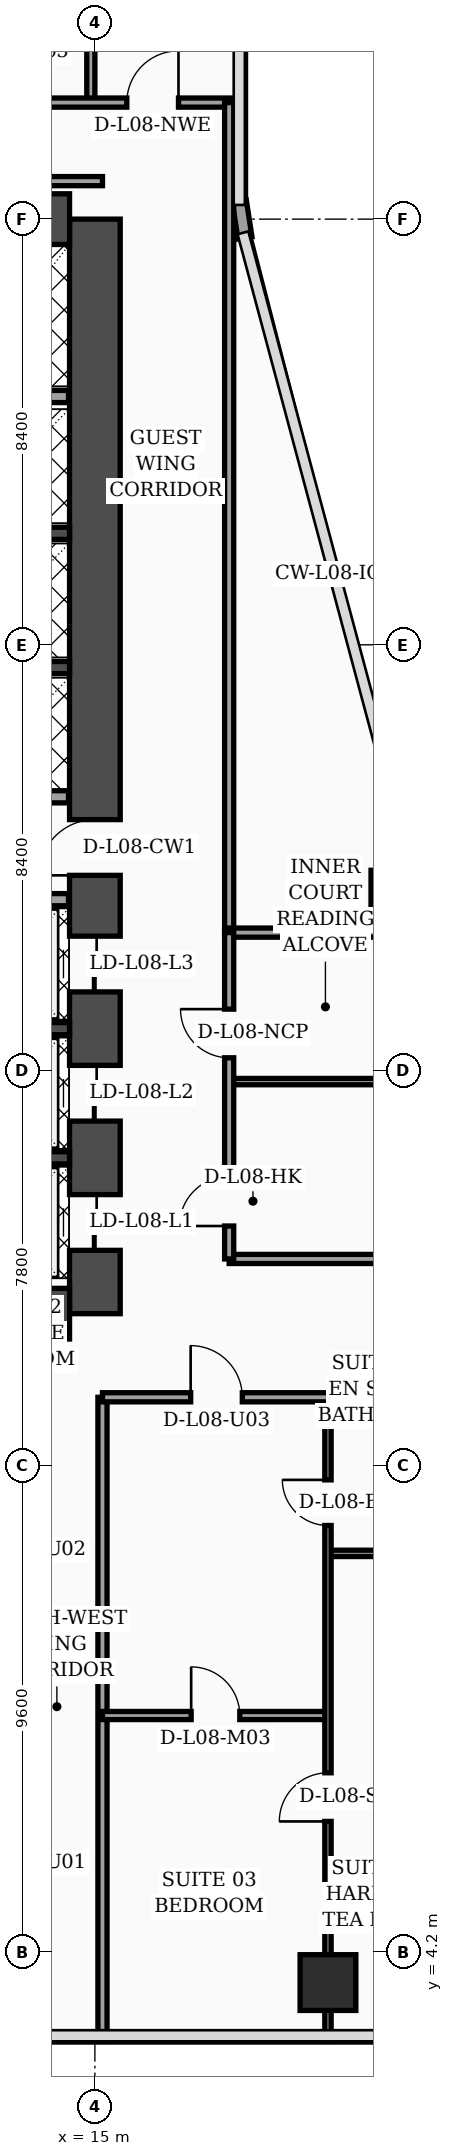
"""IFC4 building model, lengths in metres.
Left out: names, types, materials, properties, quantities, classifications, styles, units other than length and angle.
Written with IfcOpenShell. Run it as: python <this file> out.ifc"""

import sys

from ifc_helpers import new_model, si_unit, direction, frame, frame_2d, origin, origin_2d, place, context, subcontext, project, spatial, rectangle, hollow_rectangle, extrude, element, fill, save


model = new_model("IFC4")
c1 = context("Model", 3, precision=1e-05, world=origin(), true_north=direction((0.0, 1.0)))
c2 = subcontext(c1, "Body", "Model", "MODEL_VIEW")
j1 = project(units=[si_unit("LENGTHUNIT", "METRE"), si_unit("PLANEANGLEUNIT", "RADIAN")], contexts=[c1])
p1 = place(None, origin())
s1 = spatial("IfcSite", under=j1, at=p1, CompositionType="ELEMENT")
p2 = place(p1, origin())
s2 = spatial("IfcBuilding", under=s1, at=p2, CompositionType="ELEMENT")
p3 = place(p2, frame((0.0, 0.0, 38.4)))
s3 = spatial("IfcBuildingStorey", under=s2, at=p3, CompositionType="ELEMENT", Elevation=38.4)
p4 = place(p3, frame((15.0, 16.8, 0.0), z_axis=(0.0, 0.0, 1.0), x_axis=(0.0, 1.0, 0.0)))
e1 = element("IfcWall", 1, at=p4, inside=s3, PredefinedType="SHEAR", context=c2, shape_type="SweptSolid", body=[
    extrude(rectangle(XDim=21.6, YDim=1.0, at=frame_2d((10.8, 0.0))), origin(), (0.0, 0.0, 1.0), 3.56),
])
p5 = place(p4, frame((8.65, 0.0, 0.0)))
e2 = element("IfcOpeningElement", 2, at=p5, cuts=e1, PredefinedType="OPENING", context=c2, shape_type="SweptSolid", body=[
    extrude(rectangle(XDim=1.1, YDim=2.2, at=frame_2d((0.55, 1.1))), frame((0.0, 0.51, 0.0), z_axis=(0.0, -1.0, 0.0), x_axis=(1.0, 0.0, 0.0)), (0.0, 0.0, 1.0), 1.02),
])
p6 = place(p4, frame((1.25, 0.0, 0.0)))
e3 = element("IfcOpeningElement", 3, at=p6, cuts=e1, PredefinedType="OPENING", context=c2, shape_type="SweptSolid", body=[
    extrude(rectangle(XDim=1.1, YDim=2.2, at=frame_2d((0.55, 1.1))), frame((0.0, 0.51, 0.0), z_axis=(0.0, -1.0, 0.0), x_axis=(1.0, 0.0, 0.0)), (0.0, 0.0, 1.0), 1.02),
])
p7 = place(p4, frame((3.8, 0.0, 0.0)))
e4 = element("IfcOpeningElement", 4, at=p7, cuts=e1, PredefinedType="OPENING", context=c2, shape_type="SweptSolid", body=[
    extrude(rectangle(XDim=1.1, YDim=2.2, at=frame_2d((0.55, 1.1))), frame((0.0, 0.51, 0.0), z_axis=(0.0, -1.0, 0.0), x_axis=(1.0, 0.0, 0.0)), (0.0, 0.0, 1.0), 1.02),
])
p8 = place(p4, frame((6.35, 0.0, 0.0)))
e5 = element("IfcOpeningElement", 5, at=p8, cuts=e1, PredefinedType="OPENING", context=c2, shape_type="SweptSolid", body=[
    extrude(rectangle(XDim=1.1, YDim=2.2, at=frame_2d((0.55, 1.1))), frame((0.0, 0.51, 0.0), z_axis=(0.0, -1.0, 0.0), x_axis=(1.0, 0.0, 0.0)), (0.0, 0.0, 1.0), 1.02),
])
for number, where, z_axis, x_axis in (
    (6, (4.7, 38.4, 0.0), (0.0, 0.0, 1.0), (1.0, 0.0, 0.0)),
    (7, (4.7, 16.8, 0.0), (0.0, 0.0, 1.0), (1.0, 0.0, 0.0)),
):
    element("IfcWall", number, at=place(p3, frame(where, z_axis=z_axis, x_axis=x_axis)), inside=s3, PredefinedType="SHEAR", context=c2, shape_type="SweptSolid", body=[
        extrude(rectangle(XDim=9.8, YDim=1.0, at=frame_2d((4.9, 0.0))), origin(), (0.0, 0.0, 1.0), 3.56),
    ])
for number, where, z_axis, x_axis in (
    (8, (12.18, 19.875, 0.0), (0.0, 0.0, 1.0), (1.0, 0.0, 0.0)),
    (9, (12.18, 22.425, 0.0), (0.0, 0.0, 1.0), (1.0, 0.0, 0.0)),
    (10, (12.18, 29.55, 0.0), (0.0, 0.0, 1.0), (1.0, 0.0, 0.0)),
    (11, (12.18, 32.2, 0.0), (0.0, 0.0, 1.0), (1.0, 0.0, 0.0)),
):
    element("IfcWall", number, at=place(p3, frame(where, z_axis=z_axis, x_axis=x_axis)), inside=s3, PredefinedType="SOLIDWALL", context=c2, shape_type="SweptSolid", body=[
        extrude(rectangle(XDim=2.32, YDim=0.24, at=frame_2d((1.16, 0.0))), origin(), (0.0, 0.0, 1.0), 3.56),
    ])
for number, where, z_axis, x_axis in (
    (12, (21.0, 25.0, 0.0), (0.0, 0.0, 1.0), (1.0, 0.0, 0.0)),
    (13, (19.6, 3.6, 0.0), (0.0, 0.0, 1.0), (1.0, 0.0, 0.0)),
):
    element("IfcColumn", number, at=place(p3, frame(where, z_axis=z_axis, x_axis=x_axis)), inside=s3, PredefinedType="COLUMN", context=c2, shape_type="SweptSolid", body=[
        extrude(hollow_rectangle(XDim=1.1, YDim=1.1, WallThickness=0.045, at=origin_2d()), origin(), (0.0, 0.0, 1.0), 3.56),
    ])
p9 = place(p3, frame((17.962, 38.03, 0.0), z_axis=(0.0, 0.0, 1.0), x_axis=(-0.15141125477, 0.988470855377, 0.0)))
e14 = element("IfcWall", 14, at=p9, inside=s3, PredefinedType="SOLIDWALL", context=c2, shape_type="SweptSolid", body=[
    extrude(rectangle(XDim=0.739, YDim=0.28, at=frame_2d((0.369, 0.0))), origin(), (0.0, 0.0, 1.0), 3.56),
])
p10 = place(p3, frame((12.15, 24.97, 0.0), z_axis=(0.0, 0.0, 1.0), x_axis=(1.0, 0.0, 0.0)))
e15 = element("IfcWall", 15, at=p10, inside=s3, PredefinedType="SOLIDWALL", context=c2, shape_type="SweptSolid", body=[
    extrude(rectangle(XDim=2.33, YDim=0.24, at=frame_2d((1.165, 0.0))), origin(), (0.0, 0.0, 1.0), 2.84),
])
p11 = place(p3, frame((12.25, 27.0, 0.0), z_axis=(0.0, 0.0, 1.0), x_axis=(1.0, 0.0, 0.0)))
e16 = element("IfcWall", 16, at=p11, inside=s3, PredefinedType="SOLIDWALL", context=c2, shape_type="SweptSolid", body=[
    extrude(rectangle(XDim=2.23, YDim=0.24, at=frame_2d((1.115, 0.0))), origin(), (0.0, 0.0, 1.0), 3.56),
])
p12 = place(p3, frame((9.66, 34.9, 0.0), z_axis=(0.0, 0.0, 1.0), x_axis=(1.0, 0.0, 0.0)))
e17 = element("IfcWall", 17, at=p12, inside=s3, PredefinedType="SOLIDWALL", context=c2, shape_type="SweptSolid", body=[
    extrude(rectangle(XDim=4.82, YDim=0.24, at=frame_2d((2.41, 0.0))), origin(), (0.0, 0.0, 1.0), 3.56),
])
p13 = place(p3, frame((15.15, 2.44, 0.0), z_axis=(0.0, 0.0, 1.0), x_axis=(0.0, 1.0, 0.0)))
e18 = element("IfcWall", 18, at=p13, inside=s3, PredefinedType="PARTITIONING", context=c2, shape_type="SweptSolid", body=[
    extrude(rectangle(XDim=12.71, YDim=0.18, at=frame_2d((6.355, 0.0))), origin(), (0.0, 0.0, 1.0), 3.04),
])
p14 = place(p3, frame((19.6, 12.07, 0.0), z_axis=(0.0, 0.0, 1.0), x_axis=(1.0, 0.0, 0.0)))
e19 = element("IfcWall", 19, at=p14, inside=s3, PredefinedType="PARTITIONING", context=c2, shape_type="SweptSolid", body=[
    extrude(rectangle(XDim=2.0, YDim=0.125, at=frame_2d((1.0, 0.0))), origin(), (0.0, 0.0, 1.0), 3.56),
])
p15 = place(p3, frame((15.15, 8.87, 0.0), z_axis=(0.0, 0.0, 1.0), x_axis=(1.0, 0.0, 0.0)))
e20 = element("IfcWall", 20, at=p15, inside=s3, PredefinedType="PARTITIONING", context=c2, shape_type="SweptSolid", body=[
    extrude(rectangle(XDim=4.45, YDim=0.16, at=frame_2d((2.225, 0.0))), origin(), (0.0, 0.0, 1.0), 3.56),
])
p16 = place(p15, frame((1.75, 0.0, 0.0)))
e21 = element("IfcOpeningElement", 21, at=p16, cuts=e20, PredefinedType="OPENING", context=c2, shape_type="SweptSolid", body=[
    extrude(rectangle(XDim=0.96, YDim=2.2, at=frame_2d((0.48, 1.1))), frame((0.0, 0.09, 0.0), z_axis=(0.0, -1.0, 0.0), x_axis=(1.0, 0.0, 0.0)), (0.0, 0.0, 1.0), 0.18),
])
p17 = place(p3, frame((19.6, 2.44, 0.0), z_axis=(0.0, 0.0, 1.0), x_axis=(0.0, 1.0, 0.0)))
e22 = element("IfcWall", 22, at=p17, inside=s3, PredefinedType="PARTITIONING", context=c2, shape_type="SweptSolid", body=[
    extrude(rectangle(XDim=12.71, YDim=0.125, at=frame_2d((6.355, 0.0))), origin(), (0.0, 0.0, 1.0), 2.34),
])
p18 = place(p17, frame((4.34, 0.0, 0.0)))
e23 = element("IfcOpeningElement", 23, at=p18, cuts=e22, PredefinedType="OPENING", context=c2, shape_type="SweptSolid", body=[
    extrude(rectangle(XDim=0.96, YDim=2.2, at=frame_2d((0.48, 1.1))), frame((0.0, 0.073, 0.0), z_axis=(0.0, -1.0, 0.0), x_axis=(1.0, 0.0, 0.0)), (0.0, 0.0, 1.0), 0.145),
])
p19 = place(p17, frame((10.18, 0.0, 0.0)))
e24 = element("IfcOpeningElement", 24, at=p19, cuts=e22, PredefinedType="OPENING", context=c2, shape_type="SweptSolid", body=[
    extrude(rectangle(XDim=0.9, YDim=2.15, at=frame_2d((0.45, 1.075))), frame((0.0, 0.073, 0.0), z_axis=(0.0, -1.0, 0.0), x_axis=(1.0, 0.0, 0.0)), (0.0, 0.0, 1.0), 0.145),
])
p20 = place(p3, frame((15.15, 15.15, 0.0), z_axis=(0.0, 0.0, 1.0), x_axis=(1.0, 0.0, 0.0)))
e25 = element("IfcWall", 25, at=p20, inside=s3, PredefinedType="PARTITIONING", context=c2, shape_type="SweptSolid", body=[
    extrude(rectangle(XDim=6.45, YDim=0.18, at=frame_2d((3.225, 0.0))), origin(), (0.0, 0.0, 1.0), 2.34),
])
p21 = place(p20, frame((1.74, 0.0, 0.0)))
e26 = element("IfcOpeningElement", 26, at=p21, cuts=e25, PredefinedType="OPENING", context=c2, shape_type="SweptSolid", body=[
    extrude(rectangle(XDim=1.02, YDim=2.2, at=frame_2d((0.51, 1.1))), frame((0.0, 0.1, 0.0), z_axis=(0.0, -1.0, 0.0), x_axis=(1.0, 0.0, 0.0)), (0.0, 0.0, 1.0), 0.2),
])
p22 = place(p3, frame((14.92, 40.7, 0.0), z_axis=(0.0, 0.0, 1.0), x_axis=(0.0, 1.0, 0.0)))
e27 = element("IfcWall", 27, at=p22, inside=s3, PredefinedType="PARTITIONING", context=c2, shape_type="SweptSolid", body=[
    extrude(rectangle(XDim=7.1, YDim=0.16, at=frame_2d((3.55, 0.0))), origin(), (0.0, 0.0, 1.0), 3.04),
])
p23 = place(p3, frame((0.08, 40.7, 0.0), z_axis=(0.0, 0.0, 1.0), x_axis=(1.0, 0.0, 0.0)))
e28 = element("IfcWall", 28, at=p23, inside=s3, PredefinedType="PARTITIONING", context=c2, shape_type="SweptSolid", body=[
    extrude(rectangle(XDim=17.77, YDim=0.18, at=frame_2d((8.885, 0.0))), origin(), (0.0, 0.0, 1.0), 2.84),
])
p24 = place(p23, frame((0.9, 0.0, 0.0)))
e29 = element("IfcOpeningElement", 29, at=p24, cuts=e28, PredefinedType="OPENING", context=c2, shape_type="SweptSolid", body=[
    extrude(rectangle(XDim=1.02, YDim=2.2, at=frame_2d((0.51, 1.1))), frame((0.0, 0.1, 0.0), z_axis=(0.0, -1.0, 0.0), x_axis=(1.0, 0.0, 0.0)), (0.0, 0.0, 1.0), 0.2),
])
p25 = place(p23, frame((4.2, 0.0, 0.0)))
e30 = element("IfcOpeningElement", 30, at=p25, cuts=e28, PredefinedType="OPENING", context=c2, shape_type="SweptSolid", body=[
    extrude(rectangle(XDim=1.02, YDim=2.2, at=frame_2d((0.51, 1.1))), frame((0.0, 0.1, 0.0), z_axis=(0.0, -1.0, 0.0), x_axis=(1.0, 0.0, 0.0)), (0.0, 0.0, 1.0), 0.2),
])
p26 = place(p23, frame((10.08, 0.0, 0.0)))
e31 = element("IfcOpeningElement", 31, at=p26, cuts=e28, PredefinedType="OPENING", context=c2, shape_type="SweptSolid", body=[
    extrude(rectangle(XDim=1.02, YDim=2.2, at=frame_2d((0.51, 1.1))), frame((0.0, 0.1, 0.0), z_axis=(0.0, -1.0, 0.0), x_axis=(1.0, 0.0, 0.0)), (0.0, 0.0, 1.0), 0.2),
])
p27 = place(p23, frame((15.55, 0.0, 0.0)))
e32 = element("IfcOpeningElement", 32, at=p27, cuts=e28, PredefinedType="OPENING", context=c2, shape_type="SweptSolid", body=[
    extrude(rectangle(XDim=1.02, YDim=2.2, at=frame_2d((0.51, 1.1))), frame((0.0, 0.1, 0.0), z_axis=(0.0, -1.0, 0.0), x_axis=(1.0, 0.0, 0.0)), (0.0, 0.0, 1.0), 0.2),
])
p28 = place(p3, frame((17.65, 24.3, 0.0), z_axis=(0.0, 0.0, 1.0), x_axis=(0.0, 1.0, 0.0)))
e33 = element("IfcWall", 33, at=p28, inside=s3, PredefinedType="PARTITIONING", context=c2, shape_type="SweptSolid", body=[
    extrude(rectangle(XDim=16.4, YDim=0.18, at=frame_2d((8.2, 0.0))), origin(), (0.0, 0.0, 1.0), 2.84),
])
p29 = place(p3, frame((3.68, 39.15, 0.0), z_axis=(0.0, 0.0, 1.0), x_axis=(1.0, 0.0, 0.0)))
e34 = element("IfcWall", 34, at=p29, inside=s3, PredefinedType="PARTITIONING", context=c2, shape_type="SweptSolid", body=[
    extrude(rectangle(XDim=11.47, YDim=0.18, at=frame_2d((5.735, 0.0))), origin(), (0.0, 0.0, 1.0), 2.84),
])
p30 = place(p3, frame((17.65, 17.88, 0.0), z_axis=(0.0, 0.0, 1.0), x_axis=(1.0, 0.0, 0.0)))
e35 = element("IfcWall", 35, at=p30, inside=s3, PredefinedType="PARTITIONING", context=c2, shape_type="SweptSolid", body=[
    extrude(rectangle(XDim=3.9, YDim=0.18, at=frame_2d((1.95, 0.0))), origin(), (0.0, 0.0, 1.0), 3.56),
])
p31 = place(p3, frame((17.65, 21.38, 0.0), z_axis=(0.0, 0.0, 1.0), x_axis=(1.0, 0.0, 0.0)))
e36 = element("IfcWall", 36, at=p31, inside=s3, PredefinedType="PARTITIONING", context=c2, shape_type="SweptSolid", body=[
    extrude(rectangle(XDim=3.9, YDim=0.125, at=frame_2d((1.95, 0.0))), origin(), (0.0, 0.0, 1.0), 3.09),
])
p32 = place(p3, frame((17.65, 24.32, 0.0), z_axis=(0.0, 0.0, 1.0), x_axis=(1.0, 0.0, 0.0)))
e37 = element("IfcWall", 37, at=p32, inside=s3, PredefinedType="PARTITIONING", context=c2, shape_type="SweptSolid", body=[
    extrude(rectangle(XDim=3.95, YDim=0.18, at=frame_2d((1.975, 0.0))), origin(), (0.0, 0.0, 1.0), 3.56),
])
p33 = place(p3, frame((17.65, 17.88, 0.0), z_axis=(0.0, 0.0, 1.0), x_axis=(0.0, 1.0, 0.0)))
e38 = element("IfcWall", 38, at=p33, inside=s3, PredefinedType="PARTITIONING", context=c2, shape_type="SweptSolid", body=[
    extrude(rectangle(XDim=6.44, YDim=0.18, at=frame_2d((3.22, 0.0))), origin(), (0.0, 0.0, 1.0), 3.09),
])
p34 = place(p33, frame((0.65, 0.0, 0.0)))
e39 = element("IfcOpeningElement", 39, at=p34, cuts=e38, PredefinedType="OPENING", context=c2, shape_type="SweptSolid", body=[
    extrude(rectangle(XDim=0.98, YDim=2.15, at=frame_2d((0.49, 1.075))), frame((0.0, 0.1, 0.0), z_axis=(0.0, -1.0, 0.0), x_axis=(1.0, 0.0, 0.0)), (0.0, 0.0, 1.0), 0.2),
])
p35 = place(p33, frame((3.97, 0.0, 0.0)))
e40 = element("IfcOpeningElement", 40, at=p35, cuts=e38, PredefinedType="OPENING", context=c2, shape_type="SweptSolid", body=[
    extrude(rectangle(XDim=0.96, YDim=2.2, at=frame_2d((0.48, 1.1))), frame((0.0, 0.1, 0.0), z_axis=(0.0, -1.0, 0.0), x_axis=(1.0, 0.0, 0.0)), (0.0, 0.0, 1.0), 0.2),
])
p36 = place(p16, origin())
e41 = element("IfcDoor", 41, at=p36, inside=s3, OperationType="SINGLE_SWING_LEFT", PredefinedType="DOOR", context=c2, shape_type="SweptSolid", body=[
    extrude(rectangle(XDim=0.96, YDim=2.2, at=frame_2d((0.48, 1.1))), frame((0.0, 0.025, 0.0), z_axis=(0.0, -1.0, 0.0), x_axis=(1.0, 0.0, 0.0)), (0.0, 0.0, 1.0), 0.05),
])
fill(e21, e41)
p37 = place(p18, origin())
e42 = element("IfcDoor", 42, at=p37, inside=s3, OperationType="SINGLE_SWING_LEFT", PredefinedType="DOOR", context=c2, shape_type="SweptSolid", body=[
    extrude(rectangle(XDim=0.96, YDim=2.2, at=frame_2d((0.48, 1.1))), frame((0.0, 0.025, 0.0), z_axis=(0.0, -1.0, 0.0), x_axis=(1.0, 0.0, 0.0)), (0.0, 0.0, 1.0), 0.05),
])
fill(e23, e42)
p38 = place(p19, origin())
e43 = element("IfcDoor", 43, at=p38, inside=s3, OperationType="SINGLE_SWING_RIGHT", PredefinedType="DOOR", context=c2, shape_type="SweptSolid", body=[
    extrude(rectangle(XDim=0.9, YDim=2.15, at=frame_2d((0.45, 1.075))), frame((0.0, 0.025, 0.0), z_axis=(0.0, -1.0, 0.0), x_axis=(1.0, 0.0, 0.0)), (0.0, 0.0, 1.0), 0.05),
])
fill(e24, e43)
p39 = place(p21, origin())
e44 = element("IfcDoor", 44, at=p39, inside=s3, OperationType="SINGLE_SWING_LEFT", PredefinedType="DOOR", context=c2, shape_type="SweptSolid", body=[
    extrude(rectangle(XDim=1.02, YDim=2.2, at=frame_2d((0.51, 1.1))), frame((0.0, 0.025, 0.0), z_axis=(0.0, -1.0, 0.0), x_axis=(1.0, 0.0, 0.0)), (0.0, 0.0, 1.0), 0.05),
])
fill(e26, e44)
p40 = place(p27, origin())
e45 = element("IfcDoor", 45, at=p40, inside=s3, OperationType="SINGLE_SWING_RIGHT", PredefinedType="DOOR", context=c2, shape_type="SweptSolid", body=[
    extrude(rectangle(XDim=1.02, YDim=2.2, at=frame_2d((0.51, 1.1))), frame((0.0, 0.025, 0.0), z_axis=(0.0, -1.0, 0.0), x_axis=(1.0, 0.0, 0.0)), (0.0, 0.0, 1.0), 0.05),
])
fill(e32, e45)
p41 = place(p34, origin())
e46 = element("IfcDoor", 46, at=p41, inside=s3, OperationType="SINGLE_SWING_LEFT", PredefinedType="DOOR", context=c2, shape_type="SweptSolid", body=[
    extrude(rectangle(XDim=0.98, YDim=2.15, at=frame_2d((0.49, 1.075))), frame((0.0, 0.025, 0.0), z_axis=(0.0, -1.0, 0.0), x_axis=(1.0, 0.0, 0.0)), (0.0, 0.0, 1.0), 0.05),
])
fill(e39, e46)
p42 = place(p35, origin())
e47 = element("IfcDoor", 47, at=p42, inside=s3, OperationType="SINGLE_SWING_RIGHT", PredefinedType="DOOR", context=c2, shape_type="SweptSolid", body=[
    extrude(rectangle(XDim=0.96, YDim=2.2, at=frame_2d((0.48, 1.1))), frame((0.0, 0.025, 0.0), z_axis=(0.0, -1.0, 0.0), x_axis=(1.0, 0.0, 0.0)), (0.0, 0.0, 1.0), 0.05),
])
fill(e40, e47)
p43 = place(p5, origin())
e48 = element("IfcDoor", 48, at=p43, inside=s3, OperationType="SINGLE_SWING_LEFT", PredefinedType="DOOR", context=c2, shape_type="SweptSolid", body=[
    extrude(rectangle(XDim=1.1, YDim=2.2, at=frame_2d((0.55, 1.1))), frame((0.0, 0.025, 0.0), z_axis=(0.0, -1.0, 0.0), x_axis=(1.0, 0.0, 0.0)), (0.0, 0.0, 1.0), 0.05),
])
fill(e2, e48)
p44 = place(p6, origin())
e49 = element("IfcDoor", 49, at=p44, inside=s3, OperationType="DOUBLE_DOOR_SLIDING", PredefinedType="DOOR", context=c2, shape_type="SweptSolid", body=[
    extrude(rectangle(XDim=1.1, YDim=2.2, at=frame_2d((0.55, 1.1))), frame((0.0, 0.025, 0.0), z_axis=(0.0, -1.0, 0.0), x_axis=(1.0, 0.0, 0.0)), (0.0, 0.0, 1.0), 0.05),
])
fill(e3, e49)
p45 = place(p7, origin())
e50 = element("IfcDoor", 50, at=p45, inside=s3, OperationType="DOUBLE_DOOR_SLIDING", PredefinedType="DOOR", context=c2, shape_type="SweptSolid", body=[
    extrude(rectangle(XDim=1.1, YDim=2.2, at=frame_2d((0.55, 1.1))), frame((0.0, 0.025, 0.0), z_axis=(0.0, -1.0, 0.0), x_axis=(1.0, 0.0, 0.0)), (0.0, 0.0, 1.0), 0.05),
])
fill(e4, e50)
p46 = place(p8, origin())
e51 = element("IfcDoor", 51, at=p46, inside=s3, OperationType="DOUBLE_DOOR_SLIDING", PredefinedType="DOOR", context=c2, shape_type="SweptSolid", body=[
    extrude(rectangle(XDim=1.1, YDim=2.2, at=frame_2d((0.55, 1.1))), frame((0.0, 0.025, 0.0), z_axis=(0.0, -1.0, 0.0), x_axis=(1.0, 0.0, 0.0)), (0.0, 0.0, 1.0), 0.05),
])
fill(e5, e51)
save(model, sys.argv[1])
